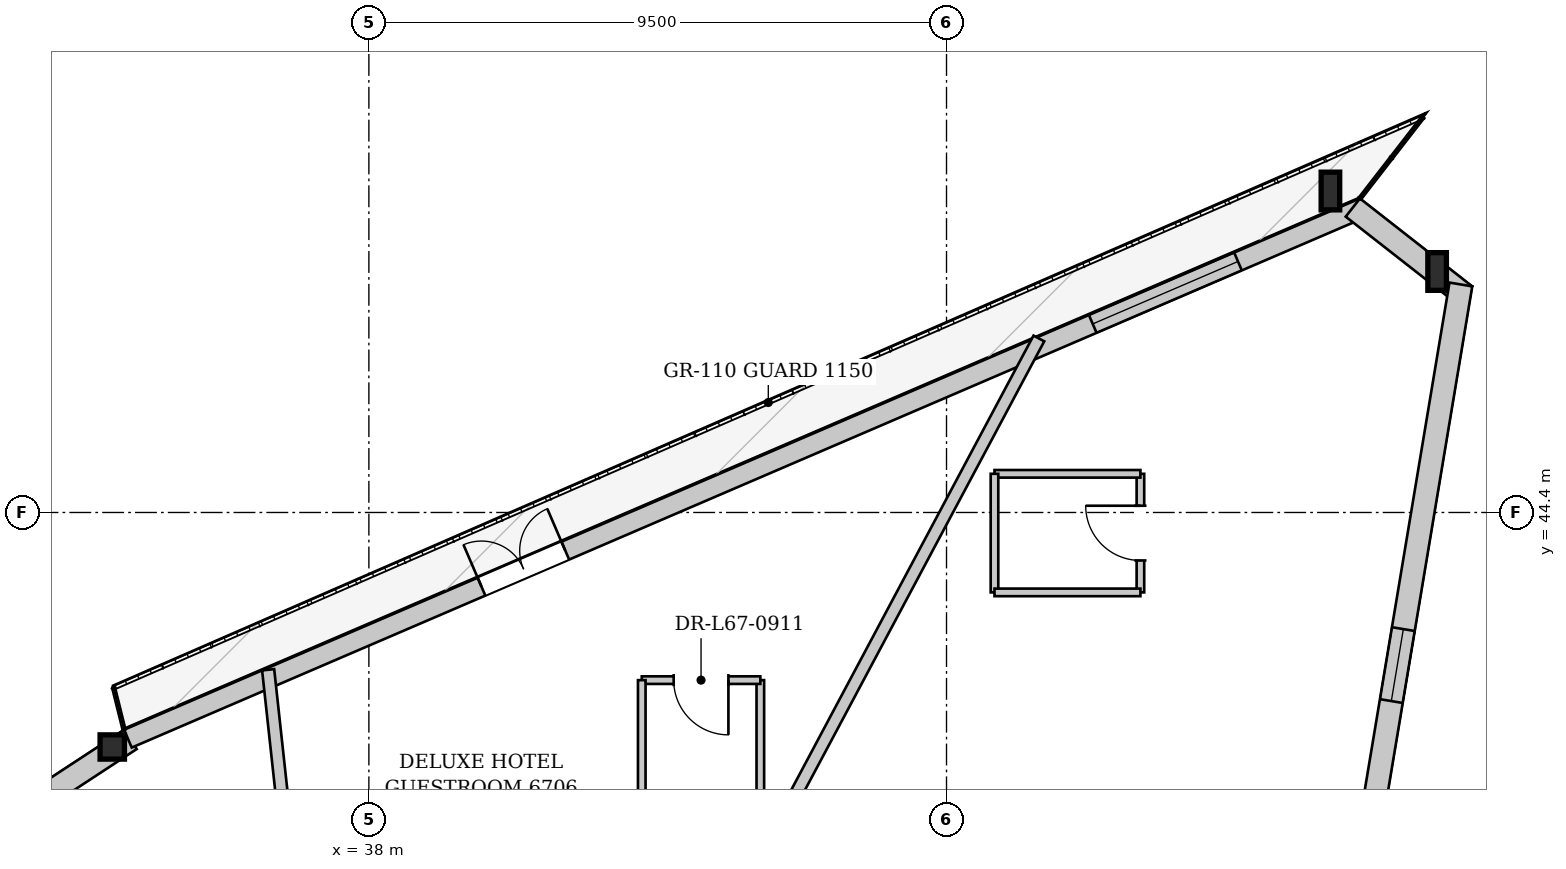
"""IFC4 building model, lengths in metres.
Left out: names, types, materials, properties, quantities, classifications, styles, units other than length and angle.
Written with IfcOpenShell. Run it as: python <this file> out.ifc"""

import sys

from ifc_helpers import new_model, si_unit, direction, frame, frame_2d, origin, origin_2d, place, context, subcontext, project, spatial, rectangle, i_section, extrude, source, transform, mapped, element, fill, save


model = new_model("IFC4")
c1 = context("Model", 3, precision=1e-05, world=origin(), true_north=direction((0.0, 1.0)))
c2 = subcontext(c1, "Body", "Model", "MODEL_VIEW")
j1 = project(units=[si_unit("LENGTHUNIT", "METRE"), si_unit("PLANEANGLEUNIT", "RADIAN")], contexts=[c1])
p1 = place(None, origin())
s1 = spatial("IfcSite", under=j1, at=p1, CompositionType="ELEMENT")
p2 = place(p1, origin())
s2 = spatial("IfcBuilding", under=s1, at=p2, CompositionType="ELEMENT")
p3 = place(p2, frame((0.0, 0.0, 252.5)))
s3 = spatial("IfcBuildingStorey", under=s2, at=p3, CompositionType="ELEMENT", Elevation=252.5)
m1 = source(origin(), c2, "Body", "SweptSolid", [
    extrude(i_section(OverallWidth=0.305, OverallDepth=0.62, WebThickness=0.021, FlangeThickness=0.04, at=origin_2d()), origin(), (0.0, 0.0, 1.0), 3.657),
])
p4 = place(p3, frame((56.146, 48.118, 0.0), z_axis=(-0.316024684734, 0.133846534198, 0.939262212549), x_axis=(-0.389995305072, -0.920816844993, 0.0)))
e1 = element("IfcColumn", 1, at=p4, inside=s3, PredefinedType="COLUMN", context=c2, shape_type="MappedRepresentation", body=[
    mapped(m1, transform((0.0, 0.0, 0.0), x_axis=(1.0, 0.0, 0.0), y_axis=(0.0, 1.0, 0.0), z_axis=(0.0, 0.0, 1.0), scale=1.0)),
])
m2 = source(origin(), c2, "Body", "SweptSolid", [
    extrude(i_section(OverallWidth=0.305, OverallDepth=0.62, WebThickness=0.021, FlangeThickness=0.04, at=origin_2d()), origin(), (0.0, 0.0, 1.0), 3.578),
])
p5 = place(p3, frame((54.299, 49.564, 0.0), z_axis=(-0.271302646107, 0.06830330703, 0.960067462455), x_axis=(-0.244142151433, -0.969739454644, 0.0)))
e2 = element("IfcColumn", 2, at=p5, inside=s3, PredefinedType="COLUMN", context=c2, shape_type="MappedRepresentation", body=[
    mapped(m2, transform((0.0, 0.0, 0.0), x_axis=(1.0, 0.0, 0.0), y_axis=(0.0, 1.0, 0.0), z_axis=(0.0, 0.0, 1.0), scale=1.0)),
])
m3 = source(origin(), c2, "Body", "SweptSolid", [
    extrude(i_section(OverallWidth=0.401, OverallDepth=0.399, WebThickness=0.022, FlangeThickness=0.034, at=origin_2d()), origin(), (0.0, 0.0, 1.0), 3.503),
])
p6 = place(p3, frame((33.973, 40.827, 0.0), z_axis=(-0.110601306067, -0.162034049531, 0.980567344902), x_axis=(0.825934119992, -0.563766644485, 0.0)))
e3 = element("IfcColumn", 3, at=p6, inside=s3, PredefinedType="COLUMN", context=c2, shape_type="MappedRepresentation", body=[
    mapped(m3, transform((0.0, 0.0, 0.0), x_axis=(1.0, 0.0, 0.0), y_axis=(0.0, 1.0, 0.0), z_axis=(0.0, 0.0, 1.0), scale=1.0)),
])
p7 = place(p3, frame((15.575, 28.539, 0.0), z_axis=(0.0, 0.0, 1.0), x_axis=(0.836303758155, 0.5482663806, 0.0)))
e4 = element("IfcWall", 4, at=p7, inside=s3, PredefinedType="SOLIDWALL", context=c2, shape_type="SweptSolid", body=[
    extrude(rectangle(XDim=22.124, YDim=0.38, at=frame_2d((11.062, 0.0))), origin(), (0.0, 0.0, 1.0), 2.872),
])
p8 = place(p7, frame((5.595, 0.0, 0.65)))
e5 = element("IfcOpeningElement", 5, at=p8, cuts=e4, PredefinedType="OPENING", context=c2, shape_type="SweptSolid", body=[
    extrude(rectangle(XDim=1.2, YDim=1.5, at=frame_2d((0.6, 0.75))), frame((0.0, 0.2, 0.0), z_axis=(0.0, -1.0, 0.0), x_axis=(1.0, 0.0, 0.0)), (0.0, 0.0, 1.0), 0.4),
])
p9 = place(p7, frame((16.929, 0.0, 0.65)))
e6 = element("IfcOpeningElement", 6, at=p9, cuts=e4, PredefinedType="OPENING", context=c2, shape_type="SweptSolid", body=[
    extrude(rectangle(XDim=1.2, YDim=1.5, at=frame_2d((0.6, 0.75))), frame((0.0, 0.2, 0.0), z_axis=(0.0, -1.0, 0.0), x_axis=(1.0, 0.0, 0.0)), (0.0, 0.0, 1.0), 0.4),
])
p10 = place(p3, frame((34.037, 40.68, 0.0), z_axis=(0.0, 0.0, 1.0), x_axis=(0.918723841861, 0.394900623444, 0.0)))
e7 = element("IfcWall", 7, at=p10, inside=s3, PredefinedType="SOLIDWALL", context=c2, shape_type="SweptSolid", body=[
    extrude(rectangle(XDim=22.124, YDim=0.32, at=frame_2d((11.062, 0.0))), origin(), (0.0, 0.0, 1.0), 2.872),
])
p11 = place(p10, frame((6.33, 0.0, 0.0)))
e8 = element("IfcOpeningElement", 8, at=p11, cuts=e7, PredefinedType="OPENING", context=c2, shape_type="SweptSolid", body=[
    extrude(rectangle(XDim=1.5, YDim=2.3, at=frame_2d((0.75, 1.15))), frame((0.0, 0.17, 0.0), z_axis=(0.0, -1.0, 0.0), x_axis=(1.0, 0.0, 0.0)), (0.0, 0.0, 1.0), 0.34),
])
p12 = place(p10, frame((17.272, 0.0, 0.402)))
e9 = element("IfcOpeningElement", 9, at=p12, cuts=e7, PredefinedType="OPENING", context=c2, shape_type="SweptSolid", body=[
    extrude(rectangle(XDim=2.6, YDim=2.35, at=frame_2d((1.3, 1.175))), frame((0.0, 0.17, 0.0), z_axis=(0.0, -1.0, 0.0), x_axis=(1.0, 0.0, 0.0)), (0.0, 0.0, 1.0), 0.34),
])
p13 = place(p3, frame((54.182, 49.415, 0.0), z_axis=(0.0, 0.0, 1.0), x_axis=(0.787515983011, -0.616294228841, 0.0)))
e10 = element("IfcWall", 10, at=p13, inside=s3, PredefinedType="SOLIDWALL", context=c2, shape_type="SweptSolid", body=[
    extrude(rectangle(XDim=2.345, YDim=0.38, at=frame_2d((1.173, 0.0))), origin(), (0.0, 0.0, 1.0), 2.872),
])
p14 = place(p3, frame((55.959, 48.15, 0.0), z_axis=(0.0, 0.0, 1.0), x_axis=(-0.164634811141, -0.986354590885, 0.0)))
e11 = element("IfcWall", 11, at=p14, inside=s3, PredefinedType="SOLIDWALL", context=c2, shape_type="SweptSolid", body=[
    extrude(rectangle(XDim=22.664, YDim=0.38, at=frame_2d((11.332, 0.0))), origin(), (0.0, 0.0, 1.0), 2.872),
])
p15 = place(p14, frame((5.746, 0.0, 0.65)))
e12 = element("IfcOpeningElement", 12, at=p15, cuts=e11, PredefinedType="OPENING", context=c2, shape_type="SweptSolid", body=[
    extrude(rectangle(XDim=1.2, YDim=1.5, at=frame_2d((0.6, 0.75))), frame((0.0, 0.2, 0.0), z_axis=(0.0, -1.0, 0.0), x_axis=(1.0, 0.0, 0.0)), (0.0, 0.0, 1.0), 0.4),
])
p16 = place(p14, frame((15.718, 0.0, 0.65)))
e13 = element("IfcOpeningElement", 13, at=p16, cuts=e11, PredefinedType="OPENING", context=c2, shape_type="SweptSolid", body=[
    extrude(rectangle(XDim=1.2, YDim=1.5, at=frame_2d((0.6, 0.75))), frame((0.0, 0.2, 0.0), z_axis=(0.0, -1.0, 0.0), x_axis=(1.0, 0.0, 0.0)), (0.0, 0.0, 1.0), 0.4),
])
p17 = place(p3, frame((42.027, 34.15, 0.0), z_axis=(0.0, 0.0, 1.0), x_axis=(0.47056606421, 0.882364765397, 0.0)))
e14 = element("IfcWall", 14, at=p17, inside=s3, PredefinedType="PARTITIONING", context=c2, shape_type="SweptSolid", body=[
    extrude(rectangle(XDim=14.86, YDim=0.2, at=frame_2d((7.43, 0.0))), origin(), (0.0, 0.0, 1.0), 3.38),
])
p18 = place(p3, frame((36.977, 36.0, 0.0), z_axis=(0.0, 0.0, 1.0), x_axis=(-0.10825472155, 0.994123189178, 0.0)))
e15 = element("IfcWall", 15, at=p18, inside=s3, PredefinedType="PARTITIONING", context=c2, shape_type="SweptSolid", body=[
    extrude(rectangle(XDim=5.848, YDim=0.2, at=frame_2d((2.924, 0.0))), origin(), (0.0, 0.0, 1.0), 3.38),
])
p19 = place(p3, frame((50.689, 43.086, 0.0), z_axis=(0.0, 0.0, 1.0), x_axis=(0.0, 1.0, 0.0)))
e16 = element("IfcWall", 16, at=p19, inside=s3, PredefinedType="PARTITIONING", context=c2, shape_type="SweptSolid", body=[
    extrude(rectangle(XDim=1.95, YDim=0.125, at=frame_2d((0.975, 0.0))), origin(), (0.0, 0.0, 1.0), 3.38),
])
p20 = place(p19, frame((0.525, 0.0, 0.0)))
e17 = element("IfcOpeningElement", 17, at=p20, cuts=e16, PredefinedType="OPENING", context=c2, shape_type="SweptSolid", body=[
    extrude(rectangle(XDim=0.9, YDim=2.1, at=frame_2d((0.45, 1.05))), frame((0.0, 0.073, 0.0), z_axis=(0.0, -1.0, 0.0), x_axis=(1.0, 0.0, 0.0)), (0.0, 0.0, 1.0), 0.145),
])
p21 = place(p3, frame((50.689, 45.036, 0.0), z_axis=(0.0, 0.0, 1.0), x_axis=(-1.0, 0.0, 0.0)))
e18 = element("IfcWall", 18, at=p21, inside=s3, PredefinedType="PARTITIONING", context=c2, shape_type="SweptSolid", body=[
    extrude(rectangle(XDim=2.4, YDim=0.125, at=frame_2d((1.2, 0.0))), origin(), (0.0, 0.0, 1.0), 3.38),
])
p22 = place(p3, frame((48.289, 45.036, 0.0), z_axis=(0.0, 0.0, 1.0), x_axis=(0.0, -1.0, 0.0)))
e19 = element("IfcWall", 19, at=p22, inside=s3, PredefinedType="PARTITIONING", context=c2, shape_type="SweptSolid", body=[
    extrude(rectangle(XDim=1.95, YDim=0.125, at=frame_2d((0.975, 0.0))), origin(), (0.0, 0.0, 1.0), 3.38),
])
p23 = place(p3, frame((48.289, 43.086, 0.0), z_axis=(0.0, 0.0, 1.0), x_axis=(1.0, 0.0, 0.0)))
e20 = element("IfcWall", 20, at=p23, inside=s3, PredefinedType="PARTITIONING", context=c2, shape_type="SweptSolid", body=[
    extrude(rectangle(XDim=2.4, YDim=0.125, at=frame_2d((1.2, 0.0))), origin(), (0.0, 0.0, 1.0), 3.125),
])
p24 = place(p3, frame((44.438, 39.243, 0.0), z_axis=(0.0, 0.0, 1.0), x_axis=(0.0, 1.0, 0.0)))
e21 = element("IfcWall", 21, at=p24, inside=s3, PredefinedType="PARTITIONING", context=c2, shape_type="SweptSolid", body=[
    extrude(rectangle(XDim=2.4, YDim=0.125, at=frame_2d((1.2, 0.0))), origin(), (0.0, 0.0, 1.0), 3.38),
])
p25 = place(p3, frame((44.438, 41.643, 0.0), z_axis=(0.0, 0.0, 1.0), x_axis=(-1.0, 0.0, 0.0)))
e22 = element("IfcWall", 22, at=p25, inside=s3, PredefinedType="PARTITIONING", context=c2, shape_type="SweptSolid", body=[
    extrude(rectangle(XDim=1.95, YDim=0.125, at=frame_2d((0.975, 0.0))), origin(), (0.0, 0.0, 1.0), 3.125),
])
p26 = place(p25, frame((0.525, 0.0, 0.0)))
e23 = element("IfcOpeningElement", 23, at=p26, cuts=e22, PredefinedType="OPENING", context=c2, shape_type="SweptSolid", body=[
    extrude(rectangle(XDim=0.9, YDim=2.1, at=frame_2d((0.45, 1.05))), frame((0.0, 0.073, 0.0), z_axis=(0.0, -1.0, 0.0), x_axis=(1.0, 0.0, 0.0)), (0.0, 0.0, 1.0), 0.145),
])
p27 = place(p3, frame((42.488, 41.643, 0.0), z_axis=(0.0, 0.0, 1.0), x_axis=(0.0, -1.0, 0.0)))
e24 = element("IfcWall", 24, at=p27, inside=s3, PredefinedType="PARTITIONING", context=c2, shape_type="SweptSolid", body=[
    extrude(rectangle(XDim=2.4, YDim=0.125, at=frame_2d((1.2, 0.0))), origin(), (0.0, 0.0, 1.0), 3.38),
])
m4 = source(origin(), c2, "Body", "SweptSolid", [
    extrude(rectangle(XDim=1.5, YDim=2.3, at=frame_2d((0.75, 1.15))), frame((0.0, 0.025, 0.0), z_axis=(0.0, -1.0, 0.0), x_axis=(1.0, 0.0, 0.0)), (0.0, 0.0, 1.0), 0.05),
])
p28 = place(p11, origin())
e25 = element("IfcDoor", 25, at=p28, inside=s3, OperationType="DOUBLE_DOOR_SINGLE_SWING", PredefinedType="DOOR", context=c2, shape_type="MappedRepresentation", body=[
    mapped(m4, transform((0.0, 0.0, 0.0), x_axis=(1.0, 0.0, 0.0), y_axis=(0.0, 1.0, 0.0), z_axis=(0.0, 0.0, 1.0), scale=1.0)),
])
fill(e8, e25)
m5 = source(origin(), c2, "Body", "SweptSolid", [
    extrude(rectangle(XDim=2.6, YDim=2.35, at=frame_2d((1.3, 1.175))), frame((0.0, 0.03, 0.0), z_axis=(0.0, -1.0, 0.0), x_axis=(1.0, 0.0, 0.0)), (0.0, 0.0, 1.0), 0.06),
])
p29 = place(p12, origin())
e26 = element("IfcWindow", 26, at=p29, inside=s3, PartitioningType="SINGLE_PANEL", PredefinedType="WINDOW", context=c2, shape_type="MappedRepresentation", body=[
    mapped(m5, transform((0.0, 0.0, 0.0), x_axis=(1.0, 0.0, 0.0), y_axis=(0.0, 1.0, 0.0), z_axis=(0.0, 0.0, 1.0), scale=1.0)),
])
fill(e9, e26)
m6 = source(origin(), c2, "Body", "SweptSolid", [
    extrude(rectangle(XDim=1.2, YDim=1.5, at=frame_2d((0.6, 0.75))), frame((0.0, 0.03, 0.0), z_axis=(0.0, -1.0, 0.0), x_axis=(1.0, 0.0, 0.0)), (0.0, 0.0, 1.0), 0.06),
])
p30 = place(p15, origin())
e27 = element("IfcWindow", 27, at=p30, inside=s3, PartitioningType="SINGLE_PANEL", PredefinedType="WINDOW", context=c2, shape_type="MappedRepresentation", body=[
    mapped(m6, transform((0.0, 0.0, 0.0), x_axis=(1.0, 0.0, 0.0), y_axis=(0.0, 1.0, 0.0), z_axis=(0.0, 0.0, 1.0), scale=1.0)),
])
fill(e12, e27)
m7 = source(origin(), c2, "Body", "SweptSolid", [
    extrude(rectangle(XDim=0.9, YDim=2.1, at=frame_2d((0.45, 1.05))), frame((0.0, 0.025, 0.0), z_axis=(0.0, -1.0, 0.0), x_axis=(1.0, 0.0, 0.0)), (0.0, 0.0, 1.0), 0.05),
])
p31 = place(p20, origin())
e28 = element("IfcDoor", 28, at=p31, inside=s3, OperationType="SINGLE_SWING_RIGHT", PredefinedType="DOOR", context=c2, shape_type="MappedRepresentation", body=[
    mapped(m7, transform((0.0, 0.0, 0.0), x_axis=(1.0, 0.0, 0.0), y_axis=(0.0, 1.0, 0.0), z_axis=(0.0, 0.0, 1.0), scale=1.0)),
])
fill(e17, e28)
p32 = place(p26, origin())
e29 = element("IfcDoor", 29, at=p32, inside=s3, OperationType="SINGLE_SWING_LEFT", PredefinedType="DOOR", context=c2, shape_type="MappedRepresentation", body=[
    mapped(m7, transform((0.0, 0.0, 0.0), x_axis=(1.0, 0.0, 0.0), y_axis=(0.0, 1.0, 0.0), z_axis=(0.0, 0.0, 1.0), scale=1.0)),
])
fill(e23, e29)
save(model, sys.argv[1])
